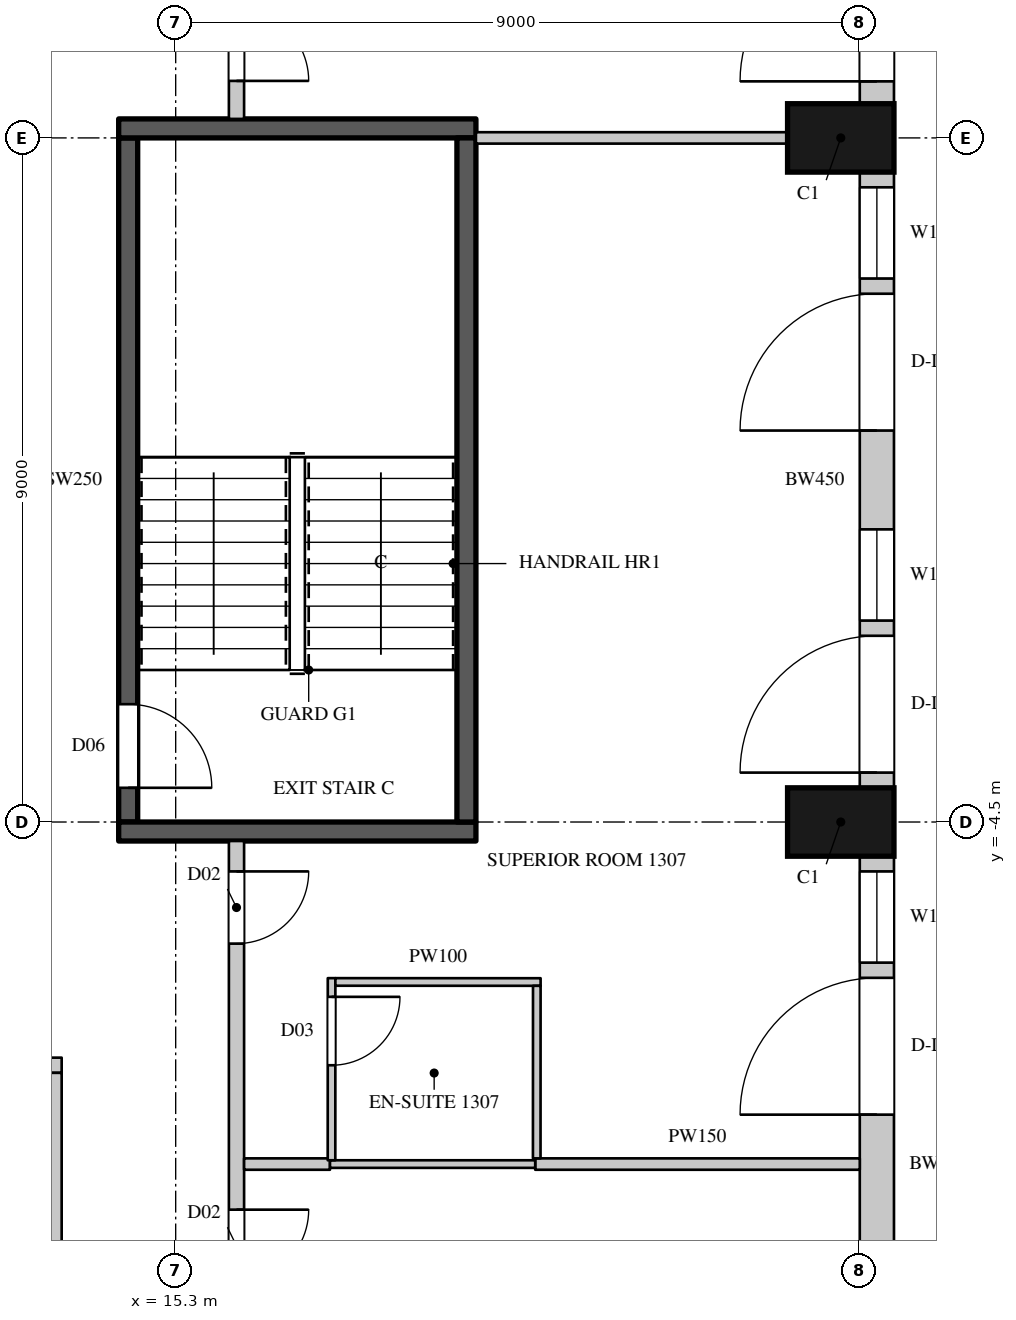
"""IFC4 building model, lengths in metres.
Left out: names, types, materials, properties, quantities, classifications, styles, units other than length and angle.
Written with IfcOpenShell. Run it as: python <this file> out.ifc"""

import sys

from ifc_helpers import new_model, si_unit, direction, frame, frame_2d, origin, origin_2d, place, context, subcontext, project, spatial, rectangle, extrude, element, fill, save


model = new_model("IFC4")
c1 = context("Model", 3, precision=1e-05, world=origin(), true_north=direction((0.0, 1.0)))
c2 = subcontext(c1, "Body", "Model", "MODEL_VIEW")
j1 = project(units=[si_unit("LENGTHUNIT", "METRE"), si_unit("PLANEANGLEUNIT", "RADIAN")], contexts=[c1])
p1 = place(None, origin())
s1 = spatial("IfcSite", under=j1, at=p1, CompositionType="ELEMENT")
p2 = place(p1, origin())
s2 = spatial("IfcBuilding", under=s1, at=p2, CompositionType="ELEMENT")
p3 = place(p2, frame((0.0, 0.0, 77.1)))
s3 = spatial("IfcBuildingStorey", under=s2, at=p3, CompositionType="ELEMENT", Elevation=77.1)
for number, where, z_axis, x_axis in (
    (1, (24.05, -4.5, 0.0), (0.0, 0.0, 1.0), (0.0, 1.0, 0.0)),
    (2, (24.05, 4.5, 0.0), (0.0, 0.0, 1.0), (0.0, 1.0, 0.0)),
):
    element("IfcColumn", number, at=place(p3, frame(where, z_axis=z_axis, x_axis=x_axis)), inside=s3, PredefinedType="COLUMN", context=c2, shape_type="SweptSolid", body=[
        extrude(rectangle(XDim=0.9, YDim=1.4, at=origin_2d()), origin(), (0.0, 0.0, 1.0), 3.6),
    ])
p4 = place(p3, frame((24.525, -13.05, 0.0), z_axis=(0.0, 0.0, 1.0), x_axis=(0.0, 1.0, 0.0)))
e3 = element("IfcWall", 3, at=p4, inside=s3, PredefinedType="SOLIDWALL", context=c2, shape_type="SweptSolid", body=[
    extrude(rectangle(XDim=8.1, YDim=0.45, at=frame_2d((4.05, 0.0))), origin(), (0.0, 0.0, 1.0), 3.3),
])
p5 = place(p4, frame((0.9, 0.0, 0.0)))
e4 = element("IfcOpeningElement", 4, at=p5, cuts=e3, PredefinedType="OPENING", context=c2, shape_type="SweptSolid", body=[
    extrude(rectangle(XDim=1.8, YDim=2.4, at=frame_2d((0.9, 1.2))), frame((0.0, 0.235, 0.0), z_axis=(0.0, -1.0, 0.0), x_axis=(1.0, 0.0, 0.0)), (0.0, 0.0, 1.0), 0.47),
])
p6 = place(p4, frame((4.7, 0.0, 0.0)))
e5 = element("IfcOpeningElement", 5, at=p6, cuts=e3, PredefinedType="OPENING", context=c2, shape_type="SweptSolid", body=[
    extrude(rectangle(XDim=1.8, YDim=2.4, at=frame_2d((0.9, 1.2))), frame((0.0, 0.235, 0.0), z_axis=(0.0, -1.0, 0.0), x_axis=(1.0, 0.0, 0.0)), (0.0, 0.0, 1.0), 0.47),
])
p7 = place(p4, frame((6.7, 0.0, 1.05)))
e6 = element("IfcOpeningElement", 6, at=p7, cuts=e3, PredefinedType="OPENING", context=c2, shape_type="SweptSolid", body=[
    extrude(rectangle(XDim=1.2, YDim=2.0, at=frame_2d((0.6, 1.0))), frame((0.0, 0.235, 0.0), z_axis=(0.0, -1.0, 0.0), x_axis=(1.0, 0.0, 0.0)), (0.0, 0.0, 1.0), 0.47),
])
p8 = place(p3, frame((24.525, -4.05, 0.0), z_axis=(0.0, 0.0, 1.0), x_axis=(0.0, 1.0, 0.0)))
e7 = element("IfcWall", 7, at=p8, inside=s3, PredefinedType="SOLIDWALL", context=c2, shape_type="SweptSolid", body=[
    extrude(rectangle(XDim=8.1, YDim=0.45, at=frame_2d((4.05, 0.0))), origin(), (0.0, 0.0, 1.0), 3.3),
])
p9 = place(p8, frame((0.2, 0.0, 0.0)))
e8 = element("IfcOpeningElement", 8, at=p9, cuts=e7, PredefinedType="OPENING", context=c2, shape_type="SweptSolid", body=[
    extrude(rectangle(XDim=1.8, YDim=2.4, at=frame_2d((0.9, 1.2))), frame((0.0, 0.235, 0.0), z_axis=(0.0, -1.0, 0.0), x_axis=(1.0, 0.0, 0.0)), (0.0, 0.0, 1.0), 0.47),
])
p10 = place(p8, frame((2.2, 0.0, 1.05)))
e9 = element("IfcOpeningElement", 9, at=p10, cuts=e7, PredefinedType="OPENING", context=c2, shape_type="SweptSolid", body=[
    extrude(rectangle(XDim=1.2, YDim=2.0, at=frame_2d((0.6, 1.0))), frame((0.0, 0.235, 0.0), z_axis=(0.0, -1.0, 0.0), x_axis=(1.0, 0.0, 0.0)), (0.0, 0.0, 1.0), 0.47),
])
p11 = place(p8, frame((4.7, 0.0, 0.0)))
e10 = element("IfcOpeningElement", 10, at=p11, cuts=e7, PredefinedType="OPENING", context=c2, shape_type="SweptSolid", body=[
    extrude(rectangle(XDim=1.8, YDim=2.4, at=frame_2d((0.9, 1.2))), frame((0.0, 0.235, 0.0), z_axis=(0.0, -1.0, 0.0), x_axis=(1.0, 0.0, 0.0)), (0.0, 0.0, 1.0), 0.47),
])
p12 = place(p8, frame((6.7, 0.0, 1.05)))
e11 = element("IfcOpeningElement", 11, at=p12, cuts=e7, PredefinedType="OPENING", context=c2, shape_type="SweptSolid", body=[
    extrude(rectangle(XDim=1.2, YDim=2.0, at=frame_2d((0.6, 1.0))), frame((0.0, 0.235, 0.0), z_axis=(0.0, -1.0, 0.0), x_axis=(1.0, 0.0, 0.0)), (0.0, 0.0, 1.0), 0.47),
])
p13 = place(p3, frame((24.525, 4.95, 0.0), z_axis=(0.0, 0.0, 1.0), x_axis=(0.0, 1.0, 0.0)))
e12 = element("IfcWall", 12, at=p13, inside=s3, PredefinedType="SOLIDWALL", context=c2, shape_type="SweptSolid", body=[
    extrude(rectangle(XDim=8.439, YDim=0.45, at=frame_2d((4.219, 0.0))), origin(), (0.0, 0.0, 1.0), 3.3),
])
p14 = place(p13, frame((0.294, 0.0, 0.0)))
e13 = element("IfcOpeningElement", 13, at=p14, cuts=e12, PredefinedType="OPENING", context=c2, shape_type="SweptSolid", body=[
    extrude(rectangle(XDim=1.8, YDim=2.4, at=frame_2d((0.9, 1.2))), frame((0.0, 0.235, 0.0), z_axis=(0.0, -1.0, 0.0), x_axis=(1.0, 0.0, 0.0)), (0.0, 0.0, 1.0), 0.47),
])
p15 = place(p13, frame((2.294, 0.0, 1.05)))
e14 = element("IfcOpeningElement", 14, at=p15, cuts=e12, PredefinedType="OPENING", context=c2, shape_type="SweptSolid", body=[
    extrude(rectangle(XDim=1.2, YDim=2.0, at=frame_2d((0.6, 1.0))), frame((0.0, 0.235, 0.0), z_axis=(0.0, -1.0, 0.0), x_axis=(1.0, 0.0, 0.0)), (0.0, 0.0, 1.0), 0.47),
])
p16 = place(p13, frame((5.232, 0.0, 1.05)))
e15 = element("IfcOpeningElement", 15, at=p16, cuts=e12, PredefinedType="OPENING", context=c2, shape_type="SweptSolid", body=[
    extrude(rectangle(XDim=2.7, YDim=2.0, at=frame_2d((1.35, 1.0))), frame((0.0, 0.235, 0.0), z_axis=(0.0, -1.0, 0.0), x_axis=(1.0, 0.0, 0.0)), (0.0, 0.0, 1.0), 0.47),
])
p17 = place(p3, frame((10.1, -7.7, 0.0), z_axis=(0.0, 0.0, 1.0), x_axis=(1.0, 0.0, 0.0)))
e16 = element("IfcWall", 16, at=p17, inside=s3, PredefinedType="PARTITIONING", context=c2, shape_type="SweptSolid", body=[
    extrude(rectangle(XDim=3.7, YDim=0.2, at=frame_2d((1.85, 0.0))), origin(), (0.0, 0.0, 1.0), 3.3),
])
p18 = place(p17, frame((2.45, 0.0, 0.0)))
e17 = element("IfcOpeningElement", 17, at=p18, cuts=e16, PredefinedType="OPENING", context=c2, shape_type="SweptSolid", body=[
    extrude(rectangle(XDim=0.9, YDim=2.2, at=frame_2d((0.45, 1.1))), frame((0.0, 0.11, 0.0), z_axis=(0.0, -1.0, 0.0), x_axis=(1.0, 0.0, 0.0)), (0.0, 0.0, 1.0), 0.22),
])
p19 = place(p3, frame((13.7, -15.0, 0.0), z_axis=(0.0, 0.0, 1.0), x_axis=(0.0, 1.0, 0.0)))
e18 = element("IfcWall", 18, at=p19, inside=s3, PredefinedType="PARTITIONING", context=c2, shape_type="SweptSolid", body=[
    extrude(rectangle(XDim=7.2, YDim=0.2, at=frame_2d((3.6, 0.0))), origin(), (0.0, 0.0, 1.0), 3.3),
])
p20 = place(p3, frame((16.1, -17.5, 0.0), z_axis=(0.0, 0.0, 1.0), x_axis=(0.0, 1.0, 0.0)))
e19 = element("IfcWall", 19, at=p20, inside=s3, PredefinedType="PARTITIONING", context=c2, shape_type="SweptSolid", body=[
    extrude(rectangle(XDim=12.75, YDim=0.2, at=frame_2d((6.375, 0.0))), origin(), (0.0, 0.0, 1.0), 3.3),
])
p21 = place(p20, frame((2.75, 0.0, 0.0)))
e20 = element("IfcOpeningElement", 20, at=p21, cuts=e19, PredefinedType="OPENING", context=c2, shape_type="SweptSolid", body=[
    extrude(rectangle(XDim=0.95, YDim=2.2, at=frame_2d((0.475, 1.1))), frame((0.0, 0.11, 0.0), z_axis=(0.0, -1.0, 0.0), x_axis=(1.0, 0.0, 0.0)), (0.0, 0.0, 1.0), 0.22),
])
p22 = place(p20, frame((6.95, 0.0, 0.0)))
e21 = element("IfcOpeningElement", 21, at=p22, cuts=e19, PredefinedType="OPENING", context=c2, shape_type="SweptSolid", body=[
    extrude(rectangle(XDim=0.95, YDim=2.2, at=frame_2d((0.475, 1.1))), frame((0.0, 0.11, 0.0), z_axis=(0.0, -1.0, 0.0), x_axis=(1.0, 0.0, 0.0)), (0.0, 0.0, 1.0), 0.22),
])
p23 = place(p20, frame((11.4, 0.0, 0.0)))
e22 = element("IfcOpeningElement", 22, at=p23, cuts=e19, PredefinedType="OPENING", context=c2, shape_type="SweptSolid", body=[
    extrude(rectangle(XDim=0.95, YDim=2.2, at=frame_2d((0.475, 1.1))), frame((0.0, 0.11, 0.0), z_axis=(0.0, -1.0, 0.0), x_axis=(1.0, 0.0, 0.0)), (0.0, 0.0, 1.0), 0.22),
])
p24 = place(p3, frame((16.1, 4.75, 0.0), z_axis=(0.0, 0.0, 1.0), x_axis=(0.0, 1.0, 0.0)))
e23 = element("IfcWall", 23, at=p24, inside=s3, PredefinedType="PARTITIONING", context=c2, shape_type="SweptSolid", body=[
    extrude(rectangle(XDim=12.65, YDim=0.2, at=frame_2d((6.325, 0.0))), origin(), (0.0, 0.0, 1.0), 3.3),
])
p25 = place(p24, frame((0.5, 0.0, 0.0)))
e24 = element("IfcOpeningElement", 24, at=p25, cuts=e23, PredefinedType="OPENING", context=c2, shape_type="SweptSolid", body=[
    extrude(rectangle(XDim=0.95, YDim=2.2, at=frame_2d((0.475, 1.1))), frame((0.0, 0.11, 0.0), z_axis=(0.0, -1.0, 0.0), x_axis=(1.0, 0.0, 0.0)), (0.0, 0.0, 1.0), 0.22),
])
p26 = place(p24, frame((6.9, 0.0, 0.0)))
e25 = element("IfcOpeningElement", 25, at=p26, cuts=e23, PredefinedType="OPENING", context=c2, shape_type="SweptSolid", body=[
    extrude(rectangle(XDim=0.95, YDim=2.2, at=frame_2d((0.475, 1.1))), frame((0.0, 0.11, 0.0), z_axis=(0.0, -1.0, 0.0), x_axis=(1.0, 0.0, 0.0)), (0.0, 0.0, 1.0), 0.22),
])
p27 = place(p3, frame((16.2, -9.0, 0.0), z_axis=(0.0, 0.0, 1.0), x_axis=(1.0, 0.0, 0.0)))
e26 = element("IfcWall", 26, at=p27, inside=s3, PredefinedType="PARTITIONING", context=c2, shape_type="SweptSolid", body=[
    extrude(rectangle(XDim=1.13, YDim=0.15, at=frame_2d((0.565, 0.0))), origin(), (0.0, 0.0, 1.0), 2.65),
])
p28 = place(p3, frame((19.25, 4.5, 0.0), z_axis=(0.0, 0.0, 1.0), x_axis=(1.0, 0.0, 0.0)))
e27 = element("IfcWall", 27, at=p28, inside=s3, PredefinedType="PARTITIONING", context=c2, shape_type="SweptSolid", body=[
    extrude(rectangle(XDim=4.1, YDim=0.15, at=frame_2d((2.05, 0.0))), origin(), (0.0, 0.0, 1.0), 3.3),
])
p29 = place(p3, frame((20.03, -9.0, 0.0), z_axis=(0.0, 0.0, 1.0), x_axis=(1.0, 0.0, 0.0)))
e28 = element("IfcWall", 28, at=p29, inside=s3, PredefinedType="PARTITIONING", context=c2, shape_type="SweptSolid", body=[
    extrude(rectangle(XDim=4.27, YDim=0.15, at=frame_2d((2.135, 0.0))), origin(), (0.0, 0.0, 1.0), 2.65),
])
p30 = place(p3, frame((14.675, -4.5, 0.0), z_axis=(0.0, 0.0, 1.0), x_axis=(0.0, 1.0, 0.0)))
e29 = element("IfcWall", 29, at=p30, inside=s3, PredefinedType="SHEAR", context=c2, shape_type="SweptSolid", body=[
    extrude(rectangle(XDim=9.0, YDim=0.25, at=frame_2d((4.5, 0.0))), origin(), (0.0, 0.0, 1.0), 3.3),
])
p31 = place(p30, frame((0.45, 0.0, 0.0)))
e30 = element("IfcOpeningElement", 30, at=p31, cuts=e29, PredefinedType="OPENING", context=c2, shape_type="SweptSolid", body=[
    extrude(rectangle(XDim=1.1, YDim=2.2, at=frame_2d((0.55, 1.1))), frame((0.0, 0.135, 0.0), z_axis=(0.0, -1.0, 0.0), x_axis=(1.0, 0.0, 0.0)), (0.0, 0.0, 1.0), 0.27),
])
for number, where, z_axis, x_axis in (
    (31, (14.55, -4.625, 0.0), (0.0, 0.0, 1.0), (1.0, 0.0, 0.0)),
    (32, (14.55, 4.625, 0.0), (0.0, 0.0, 1.0), (1.0, 0.0, 0.0)),
):
    element("IfcWall", number, at=place(p3, frame(where, z_axis=z_axis, x_axis=x_axis)), inside=s3, PredefinedType="SHEAR", context=c2, shape_type="SweptSolid", body=[
        extrude(rectangle(XDim=4.7, YDim=0.25, at=frame_2d((2.35, 0.0))), origin(), (0.0, 0.0, 1.0), 3.3),
    ])
p32 = place(p3, frame((19.125, -4.5, 0.0), z_axis=(0.0, 0.0, 1.0), x_axis=(0.0, 1.0, 0.0)))
e33 = element("IfcWall", 33, at=p32, inside=s3, PredefinedType="SHEAR", context=c2, shape_type="SweptSolid", body=[
    extrude(rectangle(XDim=9.0, YDim=0.25, at=frame_2d((4.5, 0.0))), origin(), (0.0, 0.0, 1.0), 3.3),
])
p33 = place(p3, frame((17.33, -9.0, 0.0), z_axis=(0.0, 0.0, 1.0), x_axis=(1.0, 0.0, 0.0)))
e34 = element("IfcWall", 34, at=p33, inside=s3, PredefinedType="PARTITIONING", context=c2, shape_type="SweptSolid", body=[
    extrude(rectangle(XDim=2.7, YDim=0.1, at=frame_2d((1.35, 0.0))), origin(), (0.0, 0.0, 1.0), 2.65),
])
p34 = place(p3, frame((17.35, -8.95, 0.0), z_axis=(0.0, 0.0, 1.0), x_axis=(0.000407580973, 0.999999916939, 0.0)))
e35 = element("IfcWall", 35, at=p34, inside=s3, PredefinedType="PARTITIONING", context=c2, shape_type="SweptSolid", body=[
    extrude(rectangle(XDim=2.396, YDim=0.1, at=frame_2d((1.198, 0.0))), origin(), (0.0, 0.0, 1.0), 3.3),
])
p35 = place(p34, frame((1.25, 0.0, 0.0)))
e36 = element("IfcOpeningElement", 36, at=p35, cuts=e35, PredefinedType="OPENING", context=c2, shape_type="SweptSolid", body=[
    extrude(rectangle(XDim=0.9, YDim=2.2, at=frame_2d((0.45, 1.1))), frame((0.0, 0.06, 0.0), z_axis=(0.0, -1.0, 0.0), x_axis=(1.0, 0.0, 0.0)), (0.0, 0.0, 1.0), 0.12),
])
p36 = place(p3, frame((17.401, -6.604, 0.0), z_axis=(0.0, 0.0, 1.0), x_axis=(0.9999999346, -0.000361663629, 0.0)))
e37 = element("IfcWall", 37, at=p36, inside=s3, PredefinedType="PARTITIONING", context=c2, shape_type="SweptSolid", body=[
    extrude(rectangle(XDim=2.7, YDim=0.1, at=frame_2d((1.35, 0.0))), origin(), (0.0, 0.0, 1.0), 3.3),
])
p37 = place(p3, frame((20.05, -8.925, 0.0), z_axis=(0.0, 0.0, 1.0), x_axis=(0.000430200003, 0.999999907464, 0.0)))
e38 = element("IfcWall", 38, at=p37, inside=s3, PredefinedType="PARTITIONING", context=c2, shape_type="SweptSolid", body=[
    extrude(rectangle(XDim=2.27, YDim=0.1, at=frame_2d((1.135, 0.0))), origin(), (0.0, 0.0, 1.0), 3.3),
])
p38 = place(p6, origin())
e39 = element("IfcDoor", 39, at=p38, inside=s3, OperationType="SLIDING_TO_LEFT", PredefinedType="DOOR", context=c2, shape_type="SweptSolid", body=[
    extrude(rectangle(XDim=1.8, YDim=2.4, at=frame_2d((0.9, 1.2))), frame((0.0, 0.13, 0.0), z_axis=(0.0, -1.0, 0.0), x_axis=(1.0, 0.0, 0.0)), (0.0, 0.0, 1.0), 0.05),
])
fill(e5, e39)
p39 = place(p7, origin())
e40 = element("IfcWindow", 40, at=p39, inside=s3, PartitioningType="SINGLE_PANEL", PredefinedType="WINDOW", context=c2, shape_type="SweptSolid", body=[
    extrude(rectangle(XDim=1.2, YDim=2.0, at=frame_2d((0.6, 1.0))), frame((0.0, 0.135, 0.0), z_axis=(0.0, -1.0, 0.0), x_axis=(1.0, 0.0, 0.0)), (0.0, 0.0, 1.0), 0.06),
])
fill(e6, e40)
p40 = place(p9, origin())
e41 = element("IfcDoor", 41, at=p40, inside=s3, OperationType="SLIDING_TO_LEFT", PredefinedType="DOOR", context=c2, shape_type="SweptSolid", body=[
    extrude(rectangle(XDim=1.8, YDim=2.4, at=frame_2d((0.9, 1.2))), frame((0.0, 0.13, 0.0), z_axis=(0.0, -1.0, 0.0), x_axis=(1.0, 0.0, 0.0)), (0.0, 0.0, 1.0), 0.05),
])
fill(e8, e41)
p41 = place(p10, origin())
e42 = element("IfcWindow", 42, at=p41, inside=s3, PartitioningType="SINGLE_PANEL", PredefinedType="WINDOW", context=c2, shape_type="SweptSolid", body=[
    extrude(rectangle(XDim=1.2, YDim=2.0, at=frame_2d((0.6, 1.0))), frame((0.0, 0.135, 0.0), z_axis=(0.0, -1.0, 0.0), x_axis=(1.0, 0.0, 0.0)), (0.0, 0.0, 1.0), 0.06),
])
fill(e9, e42)
p42 = place(p11, origin())
e43 = element("IfcDoor", 43, at=p42, inside=s3, OperationType="SLIDING_TO_LEFT", PredefinedType="DOOR", context=c2, shape_type="SweptSolid", body=[
    extrude(rectangle(XDim=1.8, YDim=2.4, at=frame_2d((0.9, 1.2))), frame((0.0, 0.13, 0.0), z_axis=(0.0, -1.0, 0.0), x_axis=(1.0, 0.0, 0.0)), (0.0, 0.0, 1.0), 0.05),
])
fill(e10, e43)
p43 = place(p12, origin())
e44 = element("IfcWindow", 44, at=p43, inside=s3, PartitioningType="SINGLE_PANEL", PredefinedType="WINDOW", context=c2, shape_type="SweptSolid", body=[
    extrude(rectangle(XDim=1.2, YDim=2.0, at=frame_2d((0.6, 1.0))), frame((0.0, 0.135, 0.0), z_axis=(0.0, -1.0, 0.0), x_axis=(1.0, 0.0, 0.0)), (0.0, 0.0, 1.0), 0.06),
])
fill(e11, e44)
p44 = place(p14, origin())
e45 = element("IfcDoor", 45, at=p44, inside=s3, OperationType="SLIDING_TO_LEFT", PredefinedType="DOOR", context=c2, shape_type="SweptSolid", body=[
    extrude(rectangle(XDim=1.8, YDim=2.4, at=frame_2d((0.9, 1.2))), frame((0.0, 0.13, 0.0), z_axis=(0.0, -1.0, 0.0), x_axis=(1.0, 0.0, 0.0)), (0.0, 0.0, 1.0), 0.05),
])
fill(e13, e45)
p45 = place(p22, origin())
e46 = element("IfcDoor", 46, at=p45, inside=s3, OperationType="SINGLE_SWING_LEFT", PredefinedType="DOOR", context=c2, shape_type="SweptSolid", body=[
    extrude(rectangle(XDim=0.95, YDim=2.2, at=frame_2d((0.475, 1.1))), frame((0.0, 0.025, 0.0), z_axis=(0.0, -1.0, 0.0), x_axis=(1.0, 0.0, 0.0)), (0.0, 0.0, 1.0), 0.05),
])
fill(e21, e46)
p46 = place(p23, origin())
e47 = element("IfcDoor", 47, at=p46, inside=s3, OperationType="SINGLE_SWING_LEFT", PredefinedType="DOOR", context=c2, shape_type="SweptSolid", body=[
    extrude(rectangle(XDim=0.95, YDim=2.2, at=frame_2d((0.475, 1.1))), frame((0.0, 0.025, 0.0), z_axis=(0.0, -1.0, 0.0), x_axis=(1.0, 0.0, 0.0)), (0.0, 0.0, 1.0), 0.05),
])
fill(e22, e47)
p47 = place(p35, origin())
e48 = element("IfcDoor", 48, at=p47, inside=s3, OperationType="SINGLE_SWING_LEFT", PredefinedType="DOOR", context=c2, shape_type="SweptSolid", body=[
    extrude(rectangle(XDim=0.9, YDim=2.2, at=frame_2d((0.45, 1.1))), frame((0.0, 0.025, 0.0), z_axis=(0.0, -1.0, 0.0), x_axis=(1.0, 0.0, 0.0)), (0.0, 0.0, 1.0), 0.05),
])
fill(e36, e48)
p48 = place(p25, origin())
e49 = element("IfcDoor", 49, at=p48, inside=s3, OperationType="SINGLE_SWING_RIGHT", PredefinedType="DOOR", context=c2, shape_type="SweptSolid", body=[
    extrude(rectangle(XDim=0.95, YDim=2.2, at=frame_2d((0.475, 1.1))), frame((0.0, 0.025, 0.0), z_axis=(0.0, -1.0, 0.0), x_axis=(1.0, 0.0, 0.0)), (0.0, 0.0, 1.0), 0.05),
])
fill(e24, e49)
p49 = place(p31, origin())
e50 = element("IfcDoor", 50, at=p49, inside=s3, OperationType="SINGLE_SWING_RIGHT", PredefinedType="DOOR", context=c2, shape_type="SweptSolid", body=[
    extrude(rectangle(XDim=1.1, YDim=2.2, at=frame_2d((0.55, 1.1))), frame((0.0, 0.025, 0.0), z_axis=(0.0, -1.0, 0.0), x_axis=(1.0, 0.0, 0.0)), (0.0, 0.0, 1.0), 0.05),
])
fill(e30, e50)
save(model, sys.argv[1])
